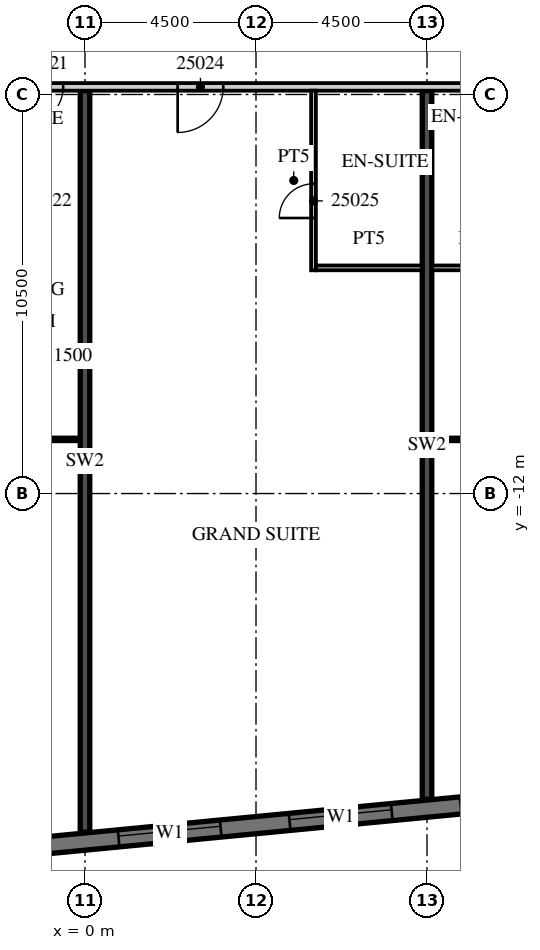
"""IFC4 building model, lengths in metres.
Left out: names, types, materials, properties, quantities, classifications, styles, units other than length and angle.
Written with IfcOpenShell. Run it as: python <this file> out.ifc"""

import sys

from ifc_helpers import new_model, si_unit, direction, frame, frame_2d, origin, place, context, subcontext, project, spatial, rectangle, extrude, element, fill, save


model = new_model("IFC4")
c1 = context("Model", 3, precision=1e-05, world=origin(), true_north=direction((0.0, 1.0)))
c2 = subcontext(c1, "Body", "Model", "MODEL_VIEW")
j1 = project(units=[si_unit("LENGTHUNIT", "METRE"), si_unit("PLANEANGLEUNIT", "RADIAN")], contexts=[c1])
p1 = place(None, origin())
s1 = spatial("IfcSite", under=j1, at=p1, CompositionType="ELEMENT")
p2 = place(p1, origin())
s2 = spatial("IfcBuilding", under=s1, at=p2, CompositionType="ELEMENT")
p3 = place(p2, frame((0.0, 0.0, 117.4)))
s3 = spatial("IfcBuildingStorey", under=s2, at=p3, CompositionType="ELEMENT", Elevation=117.4)
p4 = place(p3, frame((0.0, -20.91, 0.0), z_axis=(0.0, 0.0, 1.0), x_axis=(0.0, 1.0, 0.0)))
e1 = element("IfcWall", 1, at=p4, inside=s3, PredefinedType="SHEAR", context=c2, shape_type="SweptSolid", body=[
    extrude(rectangle(XDim=19.51, YDim=0.25, at=frame_2d((9.755, 0.0))), origin(), (0.0, 0.0, 1.0), 3.3),
])
p5 = place(p3, frame((9.0, -20.044, 0.0), z_axis=(0.0, 0.0, 1.0), x_axis=(0.0, 1.0, 0.0)))
e2 = element("IfcWall", 2, at=p5, inside=s3, PredefinedType="SHEAR", context=c2, shape_type="SweptSolid", body=[
    extrude(rectangle(XDim=18.644, YDim=0.25, at=frame_2d((9.322, 0.0))), origin(), (0.0, 0.0, 1.0), 3.3),
])
p6 = place(p3, frame((-13.521, -22.46, 0.0), z_axis=(0.0, 0.0, 1.0), x_axis=(0.995396096335, 0.095846812164, 0.0)))
e3 = element("IfcWall", 3, at=p6, inside=s3, PredefinedType="SOLIDWALL", context=c2, shape_type="SweptSolid", body=[
    extrude(rectangle(XDim=59.151, YDim=0.45, at=frame_2d((29.575, 0.0))), origin(), (0.0, 0.0, 1.0), 3.02),
])
p7 = place(p6, frame((0.91, 0.0, 0.45)))
e4 = element("IfcOpeningElement", 4, at=p7, cuts=e3, PredefinedType="OPENING", context=c2, shape_type="SweptSolid", body=[
    extrude(rectangle(XDim=2.7, YDim=2.25, at=frame_2d((1.35, 1.125))), frame((0.0, 0.235, 0.0), z_axis=(0.0, -1.0, 0.0), x_axis=(1.0, 0.0, 0.0)), (0.0, 0.0, 1.0), 0.47),
])
p8 = place(p6, frame((5.431, 0.0, 0.45)))
e5 = element("IfcOpeningElement", 5, at=p8, cuts=e3, PredefinedType="OPENING", context=c2, shape_type="SweptSolid", body=[
    extrude(rectangle(XDim=2.7, YDim=2.25, at=frame_2d((1.35, 1.125))), frame((0.0, 0.235, 0.0), z_axis=(0.0, -1.0, 0.0), x_axis=(1.0, 0.0, 0.0)), (0.0, 0.0, 1.0), 0.47),
])
p9 = place(p6, frame((9.952, 0.0, 0.45)))
e6 = element("IfcOpeningElement", 6, at=p9, cuts=e3, PredefinedType="OPENING", context=c2, shape_type="SweptSolid", body=[
    extrude(rectangle(XDim=2.7, YDim=2.25, at=frame_2d((1.35, 1.125))), frame((0.0, 0.235, 0.0), z_axis=(0.0, -1.0, 0.0), x_axis=(1.0, 0.0, 0.0)), (0.0, 0.0, 1.0), 0.47),
])
p10 = place(p6, frame((14.473, 0.0, 0.45)))
e7 = element("IfcOpeningElement", 7, at=p10, cuts=e3, PredefinedType="OPENING", context=c2, shape_type="SweptSolid", body=[
    extrude(rectangle(XDim=2.7, YDim=2.25, at=frame_2d((1.35, 1.125))), frame((0.0, 0.235, 0.0), z_axis=(0.0, -1.0, 0.0), x_axis=(1.0, 0.0, 0.0)), (0.0, 0.0, 1.0), 0.47),
])
p11 = place(p6, frame((18.994, 0.0, 0.45)))
e8 = element("IfcOpeningElement", 8, at=p11, cuts=e3, PredefinedType="OPENING", context=c2, shape_type="SweptSolid", body=[
    extrude(rectangle(XDim=2.7, YDim=2.25, at=frame_2d((1.35, 1.125))), frame((0.0, 0.235, 0.0), z_axis=(0.0, -1.0, 0.0), x_axis=(1.0, 0.0, 0.0)), (0.0, 0.0, 1.0), 0.47),
])
p12 = place(p6, frame((23.514, 0.0, 0.45)))
e9 = element("IfcOpeningElement", 9, at=p12, cuts=e3, PredefinedType="OPENING", context=c2, shape_type="SweptSolid", body=[
    extrude(rectangle(XDim=2.7, YDim=2.25, at=frame_2d((1.35, 1.125))), frame((0.0, 0.235, 0.0), z_axis=(0.0, -1.0, 0.0), x_axis=(1.0, 0.0, 0.0)), (0.0, 0.0, 1.0), 0.47),
])
p13 = place(p6, frame((28.035, 0.0, 0.45)))
e10 = element("IfcOpeningElement", 10, at=p13, cuts=e3, PredefinedType="OPENING", context=c2, shape_type="SweptSolid", body=[
    extrude(rectangle(XDim=2.7, YDim=2.25, at=frame_2d((1.35, 1.125))), frame((0.0, 0.235, 0.0), z_axis=(0.0, -1.0, 0.0), x_axis=(1.0, 0.0, 0.0)), (0.0, 0.0, 1.0), 0.47),
])
p14 = place(p6, frame((32.556, 0.0, 0.45)))
e11 = element("IfcOpeningElement", 11, at=p14, cuts=e3, PredefinedType="OPENING", context=c2, shape_type="SweptSolid", body=[
    extrude(rectangle(XDim=2.7, YDim=2.25, at=frame_2d((1.35, 1.125))), frame((0.0, 0.235, 0.0), z_axis=(0.0, -1.0, 0.0), x_axis=(1.0, 0.0, 0.0)), (0.0, 0.0, 1.0), 0.47),
])
p15 = place(p6, frame((37.077, 0.0, 0.45)))
e12 = element("IfcOpeningElement", 12, at=p15, cuts=e3, PredefinedType="OPENING", context=c2, shape_type="SweptSolid", body=[
    extrude(rectangle(XDim=2.7, YDim=2.25, at=frame_2d((1.35, 1.125))), frame((0.0, 0.235, 0.0), z_axis=(0.0, -1.0, 0.0), x_axis=(1.0, 0.0, 0.0)), (0.0, 0.0, 1.0), 0.47),
])
p16 = place(p6, frame((41.598, 0.0, 0.45)))
e13 = element("IfcOpeningElement", 13, at=p16, cuts=e3, PredefinedType="OPENING", context=c2, shape_type="SweptSolid", body=[
    extrude(rectangle(XDim=2.7, YDim=2.25, at=frame_2d((1.35, 1.125))), frame((0.0, 0.235, 0.0), z_axis=(0.0, -1.0, 0.0), x_axis=(1.0, 0.0, 0.0)), (0.0, 0.0, 1.0), 0.47),
])
p17 = place(p6, frame((46.118, 0.0, 0.45)))
e14 = element("IfcOpeningElement", 14, at=p17, cuts=e3, PredefinedType="OPENING", context=c2, shape_type="SweptSolid", body=[
    extrude(rectangle(XDim=2.7, YDim=2.25, at=frame_2d((1.35, 1.125))), frame((0.0, 0.235, 0.0), z_axis=(0.0, -1.0, 0.0), x_axis=(1.0, 0.0, 0.0)), (0.0, 0.0, 1.0), 0.47),
])
p18 = place(p6, frame((50.639, 0.0, 0.45)))
e15 = element("IfcOpeningElement", 15, at=p18, cuts=e3, PredefinedType="OPENING", context=c2, shape_type="SweptSolid", body=[
    extrude(rectangle(XDim=2.7, YDim=2.25, at=frame_2d((1.35, 1.125))), frame((0.0, 0.235, 0.0), z_axis=(0.0, -1.0, 0.0), x_axis=(1.0, 0.0, 0.0)), (0.0, 0.0, 1.0), 0.47),
])
p19 = place(p6, frame((55.15, 0.0, 0.45)))
e16 = element("IfcOpeningElement", 16, at=p19, cuts=e3, PredefinedType="OPENING", context=c2, shape_type="SweptSolid", body=[
    extrude(rectangle(XDim=2.7, YDim=2.25, at=frame_2d((1.35, 1.125))), frame((0.0, 0.235, 0.0), z_axis=(0.0, -1.0, 0.0), x_axis=(1.0, 0.0, 0.0)), (0.0, 0.0, 1.0), 0.47),
])
p20 = place(p3, frame((-13.5, -1.3, 0.0), z_axis=(0.0, 0.0, 1.0), x_axis=(1.0, 0.0, 0.0)))
e17 = element("IfcWall", 17, at=p20, inside=s3, PredefinedType="PARTITIONING", context=c2, shape_type="SweptSolid", body=[
    extrude(rectangle(XDim=60.932, YDim=0.2, at=frame_2d((30.466, 0.0))), origin(), (0.0, 0.0, 1.0), 3.02),
])
p21 = place(p20, frame((0.575, 0.0, 0.0)))
e18 = element("IfcOpeningElement", 18, at=p21, cuts=e17, PredefinedType="OPENING", context=c2, shape_type="SweptSolid", body=[
    extrude(rectangle(XDim=1.0, YDim=2.1, at=frame_2d((0.5, 1.05))), frame((0.0, 0.11, 0.0), z_axis=(0.0, -1.0, 0.0), x_axis=(1.0, 0.0, 0.0)), (0.0, 0.0, 1.0), 0.22),
])
p22 = place(p20, frame((5.075, 0.0, 0.0)))
e19 = element("IfcOpeningElement", 19, at=p22, cuts=e17, PredefinedType="OPENING", context=c2, shape_type="SweptSolid", body=[
    extrude(rectangle(XDim=1.0, YDim=2.1, at=frame_2d((0.5, 1.05))), frame((0.0, 0.11, 0.0), z_axis=(0.0, -1.0, 0.0), x_axis=(1.0, 0.0, 0.0)), (0.0, 0.0, 1.0), 0.22),
])
p23 = place(p20, frame((11.925, 0.0, 0.0)))
e20 = element("IfcOpeningElement", 20, at=p23, cuts=e17, PredefinedType="OPENING", context=c2, shape_type="SweptSolid", body=[
    extrude(rectangle(XDim=1.0, YDim=2.1, at=frame_2d((0.5, 1.05))), frame((0.0, 0.11, 0.0), z_axis=(0.0, -1.0, 0.0), x_axis=(1.0, 0.0, 0.0)), (0.0, 0.0, 1.0), 0.22),
])
p24 = place(p20, frame((15.938, 0.0, 0.0)))
e21 = element("IfcOpeningElement", 21, at=p24, cuts=e17, PredefinedType="OPENING", context=c2, shape_type="SweptSolid", body=[
    extrude(rectangle(XDim=1.2, YDim=2.1, at=frame_2d((0.6, 1.05))), frame((0.0, 0.11, 0.0), z_axis=(0.0, -1.0, 0.0), x_axis=(1.0, 0.0, 0.0)), (0.0, 0.0, 1.0), 0.22),
])
p25 = place(p20, frame((25.45, 0.0, 0.0)))
e22 = element("IfcOpeningElement", 22, at=p25, cuts=e17, PredefinedType="OPENING", context=c2, shape_type="SweptSolid", body=[
    extrude(rectangle(XDim=1.0, YDim=2.1, at=frame_2d((0.5, 1.05))), frame((0.0, 0.11, 0.0), z_axis=(0.0, -1.0, 0.0), x_axis=(1.0, 0.0, 0.0)), (0.0, 0.0, 1.0), 0.22),
])
p26 = place(p20, frame((27.55, 0.0, 0.0)))
e23 = element("IfcOpeningElement", 23, at=p26, cuts=e17, PredefinedType="OPENING", context=c2, shape_type="SweptSolid", body=[
    extrude(rectangle(XDim=1.0, YDim=2.1, at=frame_2d((0.5, 1.05))), frame((0.0, 0.11, 0.0), z_axis=(0.0, -1.0, 0.0), x_axis=(1.0, 0.0, 0.0)), (0.0, 0.0, 1.0), 0.22),
])
p27 = place(p20, frame((33.938, 0.0, 0.0)))
e24 = element("IfcOpeningElement", 24, at=p27, cuts=e17, PredefinedType="OPENING", context=c2, shape_type="SweptSolid", body=[
    extrude(rectangle(XDim=1.2, YDim=2.1, at=frame_2d((0.6, 1.05))), frame((0.0, 0.11, 0.0), z_axis=(0.0, -1.0, 0.0), x_axis=(1.0, 0.0, 0.0)), (0.0, 0.0, 1.0), 0.22),
])
p28 = place(p20, frame((45.862, 0.0, 0.0)))
e25 = element("IfcOpeningElement", 25, at=p28, cuts=e17, PredefinedType="OPENING", context=c2, shape_type="SweptSolid", body=[
    extrude(rectangle(XDim=1.2, YDim=2.1, at=frame_2d((0.6, 1.05))), frame((0.0, 0.11, 0.0), z_axis=(0.0, -1.0, 0.0), x_axis=(1.0, 0.0, 0.0)), (0.0, 0.0, 1.0), 0.22),
])
p29 = place(p20, frame((52.425, 0.0, 0.0)))
e26 = element("IfcOpeningElement", 26, at=p29, cuts=e17, PredefinedType="OPENING", context=c2, shape_type="SweptSolid", body=[
    extrude(rectangle(XDim=1.0, YDim=2.1, at=frame_2d((0.5, 1.05))), frame((0.0, 0.11, 0.0), z_axis=(0.0, -1.0, 0.0), x_axis=(1.0, 0.0, 0.0)), (0.0, 0.0, 1.0), 0.22),
])
p30 = place(p20, frame((56.95, 0.0, 0.0)))
e27 = element("IfcOpeningElement", 27, at=p30, cuts=e17, PredefinedType="OPENING", context=c2, shape_type="SweptSolid", body=[
    extrude(rectangle(XDim=1.0, YDim=2.1, at=frame_2d((0.5, 1.05))), frame((0.0, 0.11, 0.0), z_axis=(0.0, -1.0, 0.0), x_axis=(1.0, 0.0, 0.0)), (0.0, 0.0, 1.0), 0.22),
])
p31 = place(p20, frame((59.882, 0.0, 0.0)))
e28 = element("IfcOpeningElement", 28, at=p31, cuts=e17, PredefinedType="OPENING", context=c2, shape_type="SweptSolid", body=[
    extrude(rectangle(XDim=0.9, YDim=2.1, at=frame_2d((0.45, 1.05))), frame((0.0, 0.11, 0.0), z_axis=(0.0, -1.0, 0.0), x_axis=(1.0, 0.0, 0.0)), (0.0, 0.0, 1.0), 0.22),
])
p32 = place(p3, frame((-4.4, -10.575, 0.0), z_axis=(0.0, 0.0, 1.0), x_axis=(1.0, 0.0, 0.0)))
e29 = element("IfcWall", 29, at=p32, inside=s3, PredefinedType="PARTITIONING", context=c2, shape_type="SweptSolid", body=[
    extrude(rectangle(XDim=4.275, YDim=0.1, at=frame_2d((2.137, 0.0))), origin(), (0.0, 0.0, 1.0), 3.02),
])
p33 = place(p32, frame((1.988, 0.0, 0.0)))
e30 = element("IfcOpeningElement", 30, at=p33, cuts=e29, PredefinedType="OPENING", context=c2, shape_type="SweptSolid", body=[
    extrude(rectangle(XDim=1.5, YDim=2.1, at=frame_2d((0.75, 1.05))), frame((0.0, 0.06, 0.0), z_axis=(0.0, -1.0, 0.0), x_axis=(1.0, 0.0, 0.0)), (0.0, 0.0, 1.0), 0.12),
])
p34 = place(p3, frame((6.013, -6.125, 0.0), z_axis=(0.0, 0.0, 1.0), x_axis=(0.0, 1.0, 0.0)))
e31 = element("IfcWall", 31, at=p34, inside=s3, PredefinedType="PARTITIONING", context=c2, shape_type="SweptSolid", body=[
    extrude(rectangle(XDim=4.725, YDim=0.125, at=frame_2d((2.363, 0.0))), origin(), (0.0, 0.0, 1.0), 3.02),
])
p35 = place(p34, frame((1.375, 0.0, 0.0)))
e32 = element("IfcOpeningElement", 32, at=p35, cuts=e31, PredefinedType="OPENING", context=c2, shape_type="SweptSolid", body=[
    extrude(rectangle(XDim=0.9, YDim=2.1, at=frame_2d((0.45, 1.05))), frame((0.0, 0.073, 0.0), z_axis=(0.0, -1.0, 0.0), x_axis=(1.0, 0.0, 0.0)), (0.0, 0.0, 1.0), 0.145),
])
p36 = place(p3, frame((6.075, -6.062, 0.0), z_axis=(0.0, 0.0, 1.0), x_axis=(1.0, 0.0, 0.0)))
e33 = element("IfcWall", 33, at=p36, inside=s3, PredefinedType="PARTITIONING", context=c2, shape_type="SweptSolid", body=[
    extrude(rectangle(XDim=2.8, YDim=0.125, at=frame_2d((1.4, 0.0))), origin(), (0.0, 0.0, 1.0), 3.02),
])
p37 = place(p3, frame((9.125, -6.062, 0.0), z_axis=(0.0, 0.0, 1.0), x_axis=(1.0, 0.0, 0.0)))
e34 = element("IfcWall", 34, at=p37, inside=s3, PredefinedType="PARTITIONING", context=c2, shape_type="SweptSolid", body=[
    extrude(rectangle(XDim=2.25, YDim=0.125, at=frame_2d((1.125, 0.0))), origin(), (0.0, 0.0, 1.0), 3.02),
])
p38 = place(p3, frame((9.125, -10.575, 0.0), z_axis=(0.0, 0.0, 1.0), x_axis=(1.0, 0.0, 0.0)))
e35 = element("IfcWall", 35, at=p38, inside=s3, PredefinedType="PARTITIONING", context=c2, shape_type="SweptSolid", body=[
    extrude(rectangle(XDim=4.275, YDim=0.1, at=frame_2d((2.137, 0.0))), origin(), (0.0, 0.0, 1.0), 3.02),
])
p39 = place(p38, frame((1.987, 0.0, 0.0)))
e36 = element("IfcOpeningElement", 36, at=p39, cuts=e35, PredefinedType="OPENING", context=c2, shape_type="SweptSolid", body=[
    extrude(rectangle(XDim=1.5, YDim=2.1, at=frame_2d((0.75, 1.05))), frame((0.0, 0.06, 0.0), z_axis=(0.0, -1.0, 0.0), x_axis=(1.0, 0.0, 0.0)), (0.0, 0.0, 1.0), 0.12),
])
p40 = place(p10, origin())
e37 = element("IfcWindow", 37, at=p40, inside=s3, PartitioningType="SINGLE_PANEL", PredefinedType="WINDOW", context=c2, shape_type="SweptSolid", body=[
    extrude(rectangle(XDim=2.7, YDim=2.25, at=frame_2d((1.35, 1.125))), frame((0.0, 0.09, 0.0), z_axis=(0.0, -1.0, 0.0), x_axis=(1.0, 0.0, 0.0)), (0.0, 0.0, 1.0), 0.06),
])
fill(e7, e37)
p41 = place(p11, origin())
e38 = element("IfcWindow", 38, at=p41, inside=s3, PartitioningType="SINGLE_PANEL", PredefinedType="WINDOW", context=c2, shape_type="SweptSolid", body=[
    extrude(rectangle(XDim=2.7, YDim=2.25, at=frame_2d((1.35, 1.125))), frame((0.0, 0.09, 0.0), z_axis=(0.0, -1.0, 0.0), x_axis=(1.0, 0.0, 0.0)), (0.0, 0.0, 1.0), 0.06),
])
fill(e8, e38)
p42 = place(p23, origin())
e39 = element("IfcDoor", 39, at=p42, inside=s3, OperationType="SINGLE_SWING_LEFT", PredefinedType="DOOR", context=c2, shape_type="SweptSolid", body=[
    extrude(rectangle(XDim=1.0, YDim=2.1, at=frame_2d((0.5, 1.05))), frame((0.0, 0.025, 0.0), z_axis=(0.0, -1.0, 0.0), x_axis=(1.0, 0.0, 0.0)), (0.0, 0.0, 1.0), 0.05),
])
fill(e20, e39)
p43 = place(p24, origin())
e40 = element("IfcDoor", 40, at=p43, inside=s3, OperationType="SINGLE_SWING_LEFT", PredefinedType="DOOR", context=c2, shape_type="SweptSolid", body=[
    extrude(rectangle(XDim=1.2, YDim=2.1, at=frame_2d((0.6, 1.05))), frame((0.0, 0.025, 0.0), z_axis=(0.0, -1.0, 0.0), x_axis=(1.0, 0.0, 0.0)), (0.0, 0.0, 1.0), 0.05),
])
fill(e21, e40)
p44 = place(p35, origin())
e41 = element("IfcDoor", 41, at=p44, inside=s3, OperationType="SINGLE_SWING_LEFT", PredefinedType="DOOR", context=c2, shape_type="SweptSolid", body=[
    extrude(rectangle(XDim=0.9, YDim=2.1, at=frame_2d((0.45, 1.05))), frame((0.0, 0.025, 0.0), z_axis=(0.0, -1.0, 0.0), x_axis=(1.0, 0.0, 0.0)), (0.0, 0.0, 1.0), 0.05),
])
fill(e32, e41)
save(model, sys.argv[1])
